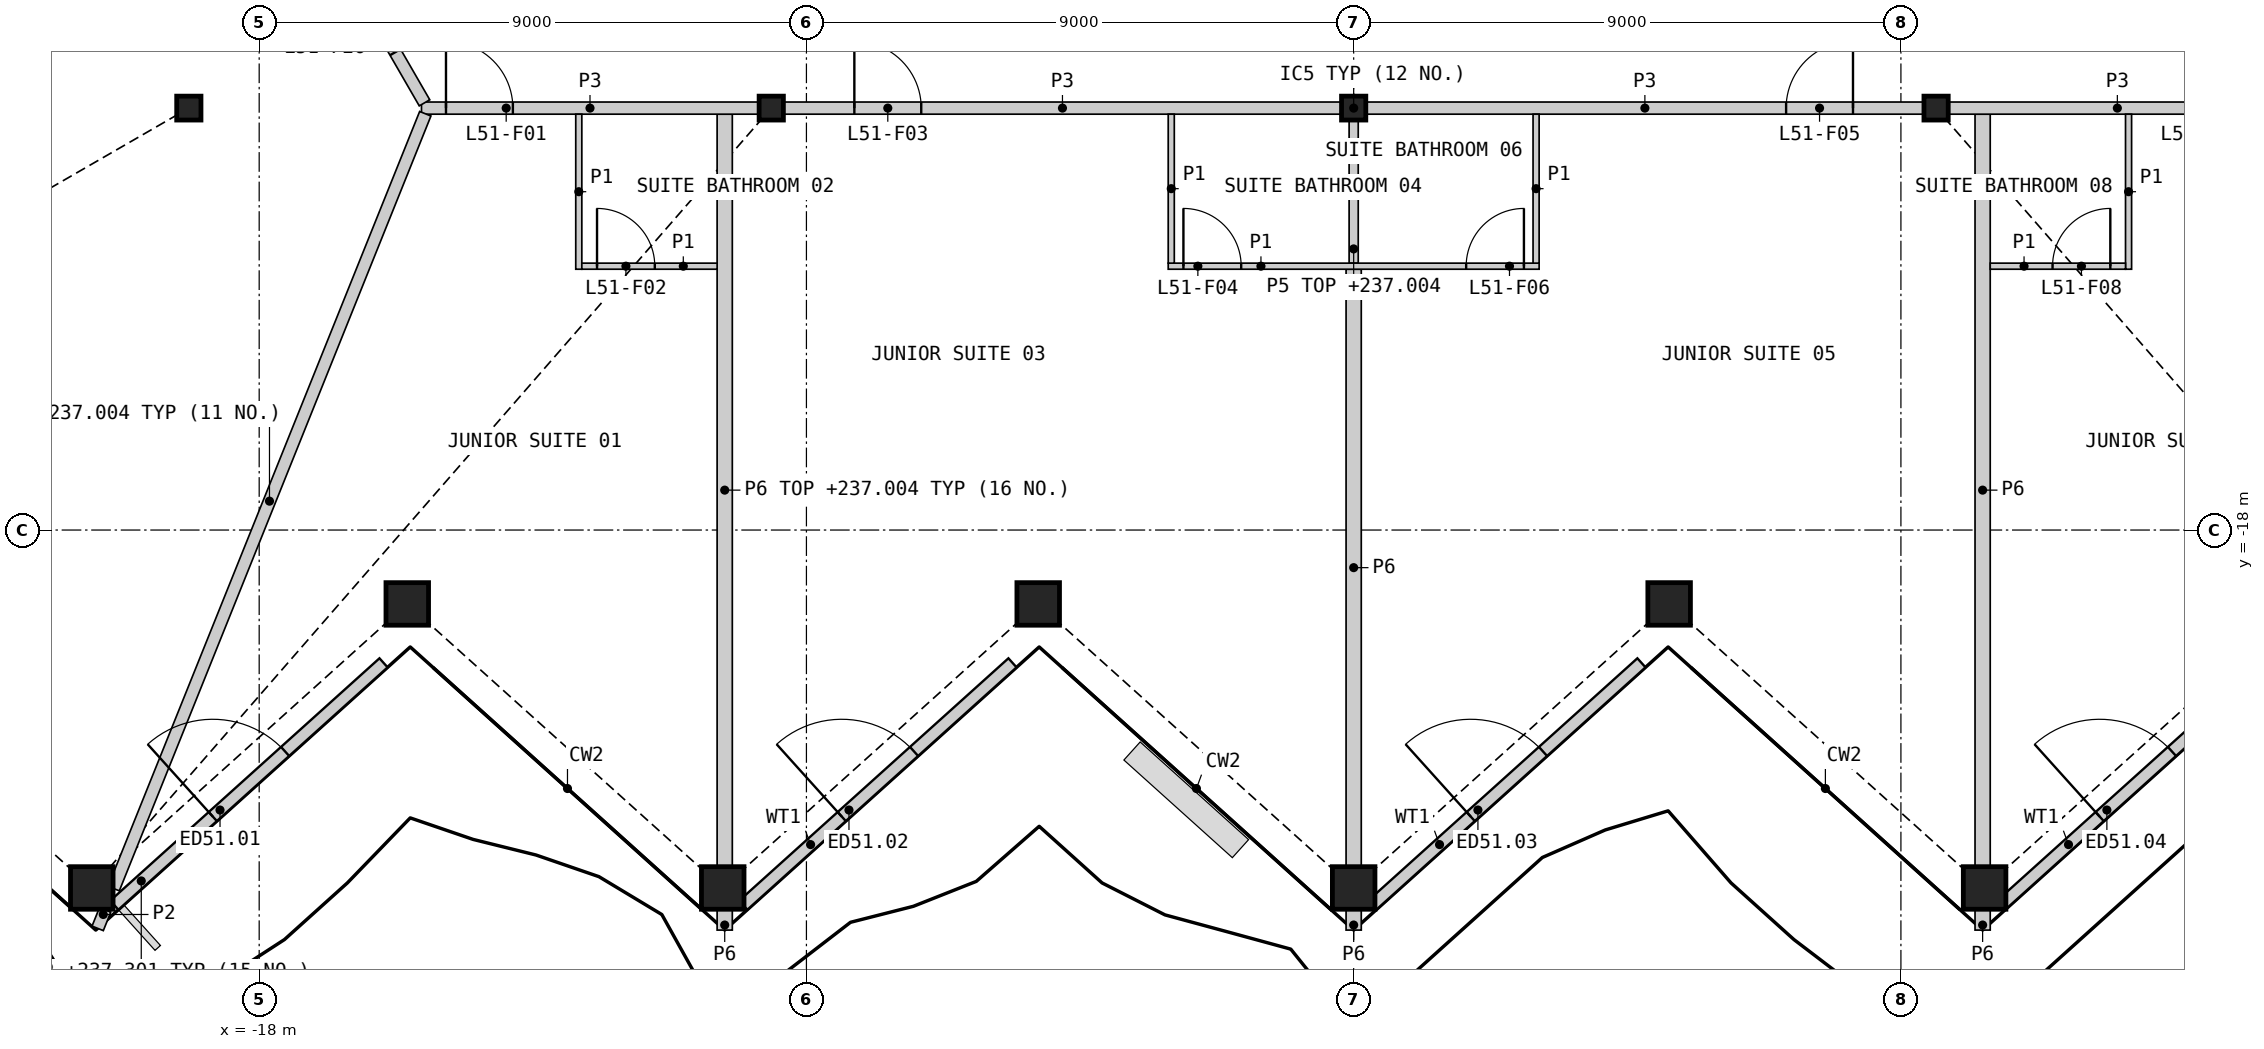
"""IFC4 building model, lengths in metres.
Left out: names, types, materials, properties, quantities, classifications, styles, units other than length and angle.
Written with IfcOpenShell. Run it as: python <this file> out.ifc"""

import sys

from ifc_helpers import new_model, si_unit, direction, frame, frame_2d, origin, origin_2d, place, context, subcontext, project, spatial, rectangle, hollow_rectangle, i_section, extrude, element, fill, save


model = new_model("IFC4")
c1 = context("Model", 3, precision=1e-05, world=origin(), true_north=direction((0.0, 1.0)))
c2 = subcontext(c1, "Body", "Model", "MODEL_VIEW")
j1 = project(units=[si_unit("LENGTHUNIT", "METRE"), si_unit("PLANEANGLEUNIT", "RADIAN")], contexts=[c1])
p1 = place(None, origin())
s1 = spatial("IfcSite", under=j1, at=p1, CompositionType="ELEMENT")
p2 = place(p1, origin())
s2 = spatial("IfcBuilding", under=s1, at=p2, CompositionType="ELEMENT")
p3 = place(p2, frame((0.0, 0.0, 234.6)))
s3 = spatial("IfcBuildingStorey", under=s2, at=p3, CompositionType="ELEMENT", Elevation=234.6)
for number, where, z_axis, x_axis in (
    (1, (-20.753, -23.887, 0.0), (0.0, 0.0, 1.0), (1.0, 0.0, 0.0)),
    (2, (-15.565, -19.215, 0.0), (0.0, 0.0, 1.0), (1.0, 0.0, 0.0)),
    (3, (-10.376, -23.887, 0.0), (0.0, 0.0, 1.0), (1.0, 0.0, 0.0)),
    (4, (-5.188, -19.215, 0.0), (0.0, 0.0, 1.0), (1.0, 0.0, 0.0)),
    (5, (0.0, -23.887, 0.0), (0.0, 0.0, 1.0), (1.0, 0.0, 0.0)),
    (6, (5.188, -19.215, 0.0), (0.0, 0.0, 1.0), (1.0, 0.0, 0.0)),
    (7, (10.376, -23.887, 0.0), (0.0, 0.0, 1.0), (1.0, 0.0, 0.0)),
):
    element("IfcColumn", number, at=place(p3, frame(where, z_axis=z_axis, x_axis=x_axis)), inside=s3, PredefinedType="COLUMN", context=c2, shape_type="SweptSolid", body=[
        extrude(hollow_rectangle(XDim=0.7, YDim=0.7, WallThickness=0.045, at=origin_2d()), origin(), (0.0, 0.0, 1.0), 3.6),
    ])
for number, where, z_axis, x_axis in (
    (8, (-19.157, -11.06, 0.0), (0.0, 0.0, 1.0), (1.0, 0.0, 0.0)),
    (9, (-9.578, -11.06, 0.0), (0.0, 0.0, 1.0), (1.0, 0.0, 0.0)),
    (10, (0.0, -11.06, 0.0), (0.0, 0.0, 1.0), (1.0, 0.0, 0.0)),
    (11, (9.578, -11.06, 0.0), (0.0, 0.0, 1.0), (1.0, 0.0, 0.0)),
):
    element("IfcColumn", number, at=place(p3, frame(where, z_axis=z_axis, x_axis=x_axis)), inside=s3, PredefinedType="COLUMN", context=c2, shape_type="SweptSolid", body=[
        extrude(i_section(OverallWidth=0.399, OverallDepth=0.393, WebThickness=0.023, FlangeThickness=0.037, at=origin_2d()), origin(), (0.0, 0.0, 1.0), 3.6),
    ])
p4 = place(p3, frame((-20.382, -24.17, 0.0), z_axis=(0.0, 0.0, 1.0), x_axis=(0.743161684399, 0.669111882155, 0.0)))
e12 = element("IfcWall", 12, at=p4, inside=s3, PredefinedType="SOLIDWALL", context=c2, shape_type="SweptSolid", body=[
    extrude(rectangle(XDim=5.958, YDim=0.2, at=frame_2d((2.979, 0.0))), origin(), (0.0, 0.0, 1.0), 2.701),
])
p5 = place(p4, frame((2.179, 0.0, 0.0)))
e13 = element("IfcOpeningElement", 13, at=p5, cuts=e12, PredefinedType="OPENING", context=c2, shape_type="SweptSolid", body=[
    extrude(rectangle(XDim=1.6, YDim=2.4, at=frame_2d((0.8, 1.2))), frame((0.0, 0.11, 0.0), z_axis=(0.0, -1.0, 0.0), x_axis=(1.0, 0.0, 0.0)), (0.0, 0.0, 1.0), 0.22),
])
p6 = place(p3, frame((-10.038, -24.17, 0.0), z_axis=(0.0, 0.0, 1.0), x_axis=(0.743143336638, 0.669132259878, 0.0)))
e14 = element("IfcWall", 14, at=p6, inside=s3, PredefinedType="SOLIDWALL", context=c2, shape_type="SweptSolid", body=[
    extrude(rectangle(XDim=5.958, YDim=0.2, at=frame_2d((2.979, 0.0))), origin(), (0.0, 0.0, 1.0), 2.701),
])
p7 = place(p6, frame((2.179, 0.0, 0.0)))
e15 = element("IfcOpeningElement", 15, at=p7, cuts=e14, PredefinedType="OPENING", context=c2, shape_type="SweptSolid", body=[
    extrude(rectangle(XDim=1.6, YDim=2.4, at=frame_2d((0.8, 1.2))), frame((0.0, 0.11, 0.0), z_axis=(0.0, -1.0, 0.0), x_axis=(1.0, 0.0, 0.0)), (0.0, 0.0, 1.0), 0.22),
])
p8 = place(p3, frame((0.305, -24.17, 0.0), z_axis=(0.0, 0.0, 1.0), x_axis=(0.743143336638, 0.669132259878, 0.0)))
e16 = element("IfcWall", 16, at=p8, inside=s3, PredefinedType="SOLIDWALL", context=c2, shape_type="SweptSolid", body=[
    extrude(rectangle(XDim=5.958, YDim=0.2, at=frame_2d((2.979, 0.0))), origin(), (0.0, 0.0, 1.0), 2.701),
])
p9 = place(p8, frame((2.179, 0.0, 0.0)))
e17 = element("IfcOpeningElement", 17, at=p9, cuts=e16, PredefinedType="OPENING", context=c2, shape_type="SweptSolid", body=[
    extrude(rectangle(XDim=1.6, YDim=2.4, at=frame_2d((0.8, 1.2))), frame((0.0, 0.11, 0.0), z_axis=(0.0, -1.0, 0.0), x_axis=(1.0, 0.0, 0.0)), (0.0, 0.0, 1.0), 0.22),
])
p10 = place(p3, frame((10.649, -24.17, 0.0), z_axis=(0.0, 0.0, 1.0), x_axis=(0.743143336638, 0.669132259878, 0.0)))
e18 = element("IfcWall", 18, at=p10, inside=s3, PredefinedType="SOLIDWALL", context=c2, shape_type="SweptSolid", body=[
    extrude(rectangle(XDim=5.958, YDim=0.2, at=frame_2d((2.979, 0.0))), origin(), (0.0, 0.0, 1.0), 2.701),
])
p11 = place(p10, frame((2.179, 0.0, 0.0)))
e19 = element("IfcOpeningElement", 19, at=p11, cuts=e18, PredefinedType="OPENING", context=c2, shape_type="SweptSolid", body=[
    extrude(rectangle(XDim=1.6, YDim=2.4, at=frame_2d((0.8, 1.2))), frame((0.0, 0.11, 0.0), z_axis=(0.0, -1.0, 0.0), x_axis=(1.0, 0.0, 0.0)), (0.0, 0.0, 1.0), 0.22),
])
for number, where, z_axis, x_axis in (
    (20, (-10.344, -23.527, 0.0), (0.0, 0.0, 1.0), (0.0, 1.0, 0.0)),
    (21, (10.344, -23.527, 0.0), (0.0, 0.0, 1.0), (0.0, 1.0, 0.0)),
):
    element("IfcWall", number, at=place(p3, frame(where, z_axis=z_axis, x_axis=x_axis)), inside=s3, PredefinedType="PARTITIONING", context=c2, shape_type="SweptSolid", body=[
        extrude(rectangle(XDim=12.366, YDim=0.25, at=frame_2d((6.183, 0.0))), origin(), (0.0, 0.0, 1.0), 2.404),
    ])
p12 = place(p3, frame((0.0, -23.527, 0.0), z_axis=(0.0, 0.0, 1.0), x_axis=(0.0, 1.0, 0.0)))
e22 = element("IfcWall", 22, at=p12, inside=s3, PredefinedType="PARTITIONING", context=c2, shape_type="SweptSolid", body=[
    extrude(rectangle(XDim=9.817, YDim=0.25, at=frame_2d((4.908, 0.0))), origin(), (0.0, 0.0, 1.0), 2.404),
])
p13 = place(p3, frame((-9.369, -11.06, 0.0), z_axis=(0.0, 0.0, 1.0), x_axis=(1.0, 0.0, 0.0)))
e23 = element("IfcWall", 23, at=p13, inside=s3, PredefinedType="PARTITIONING", context=c2, shape_type="SweptSolid", body=[
    extrude(rectangle(XDim=9.159, YDim=0.2, at=frame_2d((4.58, 0.0))), origin(), (0.0, 0.0, 1.0), 3.25),
])
p14 = place(p13, frame((1.157, 0.0, 0.0)))
e24 = element("IfcOpeningElement", 24, at=p14, cuts=e23, PredefinedType="OPENING", context=c2, shape_type="SweptSolid", body=[
    extrude(rectangle(XDim=1.1, YDim=2.1, at=frame_2d((0.55, 1.05))), frame((0.0, 0.11, 0.0), z_axis=(0.0, -1.0, 0.0), x_axis=(1.0, 0.0, 0.0)), (0.0, 0.0, 1.0), 0.22),
])
p15 = place(p3, frame((0.209, -11.06, 0.0), z_axis=(0.0, 0.0, 1.0), x_axis=(1.0, 0.0, 0.0)))
e25 = element("IfcWall", 25, at=p15, inside=s3, PredefinedType="PARTITIONING", context=c2, shape_type="SweptSolid", body=[
    extrude(rectangle(XDim=9.159, YDim=0.2, at=frame_2d((4.58, 0.0))), origin(), (0.0, 0.0, 1.0), 3.25),
])
p16 = place(p15, frame((6.902, 0.0, 0.0)))
e26 = element("IfcOpeningElement", 26, at=p16, cuts=e25, PredefinedType="OPENING", context=c2, shape_type="SweptSolid", body=[
    extrude(rectangle(XDim=1.1, YDim=2.1, at=frame_2d((0.55, 1.05))), frame((0.0, 0.11, 0.0), z_axis=(0.0, -1.0, 0.0), x_axis=(1.0, 0.0, 0.0)), (0.0, 0.0, 1.0), 0.22),
])
p17 = place(p3, frame((-15.331, -11.06, 0.0), z_axis=(0.0, 0.0, 1.0), x_axis=(1.0, 0.0, 0.0)))
e27 = element("IfcWall", 27, at=p17, inside=s3, PredefinedType="PARTITIONING", context=c2, shape_type="SweptSolid", body=[
    extrude(rectangle(XDim=5.543, YDim=0.2, at=frame_2d((2.771, 0.0))), origin(), (0.0, 0.0, 1.0), 3.25),
])
p18 = place(p17, frame((0.403, 0.0, 0.0)))
e28 = element("IfcOpeningElement", 28, at=p18, cuts=e27, PredefinedType="OPENING", context=c2, shape_type="SweptSolid", body=[
    extrude(rectangle(XDim=1.1, YDim=2.1, at=frame_2d((0.55, 1.05))), frame((0.0, 0.11, 0.0), z_axis=(0.0, -1.0, 0.0), x_axis=(1.0, 0.0, 0.0)), (0.0, 0.0, 1.0), 0.22),
])
p19 = place(p3, frame((9.788, -11.06, 0.0), z_axis=(0.0, 0.0, 1.0), x_axis=(1.0, 0.0, 0.0)))
e29 = element("IfcWall", 29, at=p19, inside=s3, PredefinedType="PARTITIONING", context=c2, shape_type="SweptSolid", body=[
    extrude(rectangle(XDim=5.543, YDim=0.2, at=frame_2d((2.771, 0.0))), origin(), (0.0, 0.0, 1.0), 3.25),
])
p20 = place(p19, frame((4.04, 0.0, 0.0)))
e30 = element("IfcOpeningElement", 30, at=p20, cuts=e29, PredefinedType="OPENING", context=c2, shape_type="SweptSolid", body=[
    extrude(rectangle(XDim=1.1, YDim=2.1, at=frame_2d((0.55, 1.05))), frame((0.0, 0.11, 0.0), z_axis=(0.0, -1.0, 0.0), x_axis=(1.0, 0.0, 0.0)), (0.0, 0.0, 1.0), 0.22),
])
p21 = place(p3, frame((-17.194, -7.66, 0.0), z_axis=(0.0, 0.0, 1.0), x_axis=(0.499989446428, -0.866031496806, 0.0)))
e31 = element("IfcWall", 31, at=p21, inside=s3, PredefinedType="PARTITIONING", context=c2, shape_type="SweptSolid", body=[
    extrude(rectangle(XDim=3.826, YDim=0.2, at=frame_2d((1.913, 0.0))), origin(), (0.0, 0.0, 1.0), 3.25),
])
p22 = place(p21, frame((1.064, 0.0, 0.0)))
e32 = element("IfcOpeningElement", 32, at=p22, cuts=e31, PredefinedType="OPENING", context=c2, shape_type="SweptSolid", body=[
    extrude(rectangle(XDim=1.8, YDim=2.1, at=frame_2d((0.9, 1.05))), frame((0.0, 0.11, 0.0), z_axis=(0.0, -1.0, 0.0), x_axis=(1.0, 0.0, 0.0)), (0.0, 0.0, 1.0), 0.22),
])
for number, where, z_axis, x_axis in (
    (33, (-10.344, -24.58, 0.0), (0.0, 0.0, 1.0), (0.0, 1.0, 0.0)),
    (34, (0.0, -24.58, 0.0), (0.0, 0.0, 1.0), (0.0, 1.0, 0.0)),
    (35, (10.344, -24.58, 0.0), (0.0, 0.0, 1.0), (0.0, 1.0, 0.0)),
):
    element("IfcWall", number, at=place(p3, frame(where, z_axis=z_axis, x_axis=x_axis)), inside=s3, PredefinedType="PARTITIONING", context=c2, shape_type="SweptSolid", body=[
        extrude(rectangle(XDim=0.333, YDim=0.25, at=frame_2d((0.167, 0.0))), origin(), (0.0, 0.0, 1.0), 2.404),
    ])
p23 = place(p3, frame((-20.393, -23.897, 0.0), z_axis=(0.0, 0.0, 1.0), x_axis=(0.373096979113, 0.927792349708, 0.0)))
e36 = element("IfcWall", 36, at=p23, inside=s3, PredefinedType="PARTITIONING", context=c2, shape_type="SweptSolid", body=[
    extrude(rectangle(XDim=13.736, YDim=0.2, at=frame_2d((6.868, 0.0))), origin(), (0.0, 0.0, 1.0), 2.404),
])
p24 = place(p3, frame((-20.656, -24.551, 0.0), z_axis=(0.0, 0.0, 1.0), x_axis=(0.372801499492, 0.927911117498, 0.0)))
e37 = element("IfcWall", 37, at=p24, inside=s3, PredefinedType="PARTITIONING", context=c2, shape_type="SweptSolid", body=[
    extrude(rectangle(XDim=0.328, YDim=0.2, at=frame_2d((0.164, 0.0))), origin(), (0.0, 0.0, 1.0), 2.404),
])
p25 = place(p3, frame((0.0, -13.61, 0.0), z_axis=(0.0, 0.0, 1.0), x_axis=(0.0, 1.0, 0.0)))
e38 = element("IfcWall", 38, at=p25, inside=s3, PredefinedType="PLUMBINGWALL", context=c2, shape_type="SweptSolid", body=[
    extrude(rectangle(XDim=2.341, YDim=0.15, at=frame_2d((1.17, 0.0))), origin(), (0.0, 0.0, 1.0), 2.404),
])
p26 = place(p3, frame((-3.05, -13.66, 0.0), z_axis=(0.0, 0.0, 1.0), x_axis=(1.0, 0.0, 0.0)))
e39 = element("IfcWall", 39, at=p26, inside=s3, PredefinedType="PARTITIONING", context=c2, shape_type="SweptSolid", body=[
    extrude(rectangle(XDim=6.1, YDim=0.1, at=frame_2d((3.05, 0.0))), origin(), (0.0, 0.0, 1.0), 2.404),
])
p27 = place(p26, frame((0.25, 0.0, 0.0)))
e40 = element("IfcOpeningElement", 40, at=p27, cuts=e39, PredefinedType="OPENING", context=c2, shape_type="SweptSolid", body=[
    extrude(rectangle(XDim=0.95, YDim=2.1, at=frame_2d((0.475, 1.05))), frame((0.0, 0.06, 0.0), z_axis=(0.0, -1.0, 0.0), x_axis=(1.0, 0.0, 0.0)), (0.0, 0.0, 1.0), 0.12),
])
p28 = place(p26, frame((4.9, 0.0, 0.0)))
e41 = element("IfcOpeningElement", 41, at=p28, cuts=e39, PredefinedType="OPENING", context=c2, shape_type="SweptSolid", body=[
    extrude(rectangle(XDim=0.95, YDim=2.1, at=frame_2d((0.475, 1.05))), frame((0.0, 0.06, 0.0), z_axis=(0.0, -1.0, 0.0), x_axis=(1.0, 0.0, 0.0)), (0.0, 0.0, 1.0), 0.12),
])
p29 = place(p3, frame((-12.744, -13.71, 0.0), z_axis=(0.0, 0.0, 1.0), x_axis=(0.0, 1.0, 0.0)))
e42 = element("IfcWall", 42, at=p29, inside=s3, PredefinedType="PARTITIONING", context=c2, shape_type="SweptSolid", body=[
    extrude(rectangle(XDim=2.55, YDim=0.1, at=frame_2d((1.275, 0.0))), origin(), (0.0, 0.0, 1.0), 2.404),
])
for number, where, z_axis, x_axis in (
    (43, (-3.0, -13.61, 0.0), (0.0, 0.0, 1.0), (0.0, 1.0, 0.0)),
    (44, (3.0, -13.61, 0.0), (0.0, 0.0, 1.0), (0.0, 1.0, 0.0)),
):
    element("IfcWall", number, at=place(p3, frame(where, z_axis=z_axis, x_axis=x_axis)), inside=s3, PredefinedType="PARTITIONING", context=c2, shape_type="SweptSolid", body=[
        extrude(rectangle(XDim=2.45, YDim=0.1, at=frame_2d((1.225, 0.0))), origin(), (0.0, 0.0, 1.0), 2.404),
    ])
p30 = place(p3, frame((12.744, -13.71, 0.0), z_axis=(0.0, 0.0, 1.0), x_axis=(0.0, 1.0, 0.0)))
e45 = element("IfcWall", 45, at=p30, inside=s3, PredefinedType="PARTITIONING", context=c2, shape_type="SweptSolid", body=[
    extrude(rectangle(XDim=2.55, YDim=0.1, at=frame_2d((1.275, 0.0))), origin(), (0.0, 0.0, 1.0), 2.404),
])
p31 = place(p3, frame((-12.694, -13.66, 0.0), z_axis=(0.0, 0.0, 1.0), x_axis=(1.0, 0.0, 0.0)))
e46 = element("IfcWall", 46, at=p31, inside=s3, PredefinedType="PARTITIONING", context=c2, shape_type="SweptSolid", body=[
    extrude(rectangle(XDim=2.225, YDim=0.1, at=frame_2d((1.113, 0.0))), origin(), (0.0, 0.0, 1.0), 2.404),
])
p32 = place(p31, frame((0.25, 0.0, 0.0)))
e47 = element("IfcOpeningElement", 47, at=p32, cuts=e46, PredefinedType="OPENING", context=c2, shape_type="SweptSolid", body=[
    extrude(rectangle(XDim=0.95, YDim=2.1, at=frame_2d((0.475, 1.05))), frame((0.0, 0.06, 0.0), z_axis=(0.0, -1.0, 0.0), x_axis=(1.0, 0.0, 0.0)), (0.0, 0.0, 1.0), 0.12),
])
p33 = place(p3, frame((10.469, -13.66, 0.0), z_axis=(0.0, 0.0, 1.0), x_axis=(1.0, 0.0, 0.0)))
e48 = element("IfcWall", 48, at=p33, inside=s3, PredefinedType="PARTITIONING", context=c2, shape_type="SweptSolid", body=[
    extrude(rectangle(XDim=2.225, YDim=0.1, at=frame_2d((1.113, 0.0))), origin(), (0.0, 0.0, 1.0), 2.404),
])
p34 = place(p33, frame((1.025, 0.0, 0.0)))
e49 = element("IfcOpeningElement", 49, at=p34, cuts=e48, PredefinedType="OPENING", context=c2, shape_type="SweptSolid", body=[
    extrude(rectangle(XDim=0.95, YDim=2.1, at=frame_2d((0.475, 1.05))), frame((0.0, 0.06, 0.0), z_axis=(0.0, -1.0, 0.0), x_axis=(1.0, 0.0, 0.0)), (0.0, 0.0, 1.0), 0.12),
])
p35 = place(p5, origin())
e50 = element("IfcDoor", 50, at=p35, inside=s3, OperationType="DOUBLE_DOOR_SINGLE_SWING", PredefinedType="DOOR", context=c2, shape_type="SweptSolid", body=[
    extrude(rectangle(XDim=1.6, YDim=2.4, at=frame_2d((0.8, 1.2))), frame((0.0, 0.025, 0.0), z_axis=(0.0, -1.0, 0.0), x_axis=(1.0, 0.0, 0.0)), (0.0, 0.0, 1.0), 0.05),
])
fill(e13, e50)
p36 = place(p7, origin())
e51 = element("IfcDoor", 51, at=p36, inside=s3, OperationType="DOUBLE_DOOR_SINGLE_SWING", PredefinedType="DOOR", context=c2, shape_type="SweptSolid", body=[
    extrude(rectangle(XDim=1.6, YDim=2.4, at=frame_2d((0.8, 1.2))), frame((0.0, 0.025, 0.0), z_axis=(0.0, -1.0, 0.0), x_axis=(1.0, 0.0, 0.0)), (0.0, 0.0, 1.0), 0.05),
])
fill(e15, e51)
p37 = place(p9, origin())
e52 = element("IfcDoor", 52, at=p37, inside=s3, OperationType="DOUBLE_DOOR_SINGLE_SWING", PredefinedType="DOOR", context=c2, shape_type="SweptSolid", body=[
    extrude(rectangle(XDim=1.6, YDim=2.4, at=frame_2d((0.8, 1.2))), frame((0.0, 0.025, 0.0), z_axis=(0.0, -1.0, 0.0), x_axis=(1.0, 0.0, 0.0)), (0.0, 0.0, 1.0), 0.05),
])
fill(e17, e52)
p38 = place(p11, origin())
e53 = element("IfcDoor", 53, at=p38, inside=s3, OperationType="DOUBLE_DOOR_SINGLE_SWING", PredefinedType="DOOR", context=c2, shape_type="SweptSolid", body=[
    extrude(rectangle(XDim=1.6, YDim=2.4, at=frame_2d((0.8, 1.2))), frame((0.0, 0.025, 0.0), z_axis=(0.0, -1.0, 0.0), x_axis=(1.0, 0.0, 0.0)), (0.0, 0.0, 1.0), 0.05),
])
fill(e19, e53)
p39 = place(p18, origin())
e54 = element("IfcDoor", 54, at=p39, inside=s3, OperationType="SINGLE_SWING_LEFT", PredefinedType="DOOR", context=c2, shape_type="SweptSolid", body=[
    extrude(rectangle(XDim=1.1, YDim=2.1, at=frame_2d((0.55, 1.05))), frame((0.0, 0.025, 0.0), z_axis=(0.0, -1.0, 0.0), x_axis=(1.0, 0.0, 0.0)), (0.0, 0.0, 1.0), 0.05),
])
fill(e28, e54)
p40 = place(p32, origin())
e55 = element("IfcDoor", 55, at=p40, inside=s3, OperationType="SINGLE_SWING_LEFT", PredefinedType="DOOR", context=c2, shape_type="SweptSolid", body=[
    extrude(rectangle(XDim=0.95, YDim=2.1, at=frame_2d((0.475, 1.05))), frame((0.0, 0.025, 0.0), z_axis=(0.0, -1.0, 0.0), x_axis=(1.0, 0.0, 0.0)), (0.0, 0.0, 1.0), 0.05),
])
fill(e47, e55)
p41 = place(p14, origin())
e56 = element("IfcDoor", 56, at=p41, inside=s3, OperationType="SINGLE_SWING_LEFT", PredefinedType="DOOR", context=c2, shape_type="SweptSolid", body=[
    extrude(rectangle(XDim=1.1, YDim=2.1, at=frame_2d((0.55, 1.05))), frame((0.0, 0.025, 0.0), z_axis=(0.0, -1.0, 0.0), x_axis=(1.0, 0.0, 0.0)), (0.0, 0.0, 1.0), 0.05),
])
fill(e24, e56)
p42 = place(p27, origin())
e57 = element("IfcDoor", 57, at=p42, inside=s3, OperationType="SINGLE_SWING_LEFT", PredefinedType="DOOR", context=c2, shape_type="SweptSolid", body=[
    extrude(rectangle(XDim=0.95, YDim=2.1, at=frame_2d((0.475, 1.05))), frame((0.0, 0.025, 0.0), z_axis=(0.0, -1.0, 0.0), x_axis=(1.0, 0.0, 0.0)), (0.0, 0.0, 1.0), 0.05),
])
fill(e40, e57)
p43 = place(p16, origin())
e58 = element("IfcDoor", 58, at=p43, inside=s3, OperationType="SINGLE_SWING_RIGHT", PredefinedType="DOOR", context=c2, shape_type="SweptSolid", body=[
    extrude(rectangle(XDim=1.1, YDim=2.1, at=frame_2d((0.55, 1.05))), frame((0.0, 0.025, 0.0), z_axis=(0.0, -1.0, 0.0), x_axis=(1.0, 0.0, 0.0)), (0.0, 0.0, 1.0), 0.05),
])
fill(e26, e58)
p44 = place(p28, origin())
e59 = element("IfcDoor", 59, at=p44, inside=s3, OperationType="SINGLE_SWING_RIGHT", PredefinedType="DOOR", context=c2, shape_type="SweptSolid", body=[
    extrude(rectangle(XDim=0.95, YDim=2.1, at=frame_2d((0.475, 1.05))), frame((0.0, 0.025, 0.0), z_axis=(0.0, -1.0, 0.0), x_axis=(1.0, 0.0, 0.0)), (0.0, 0.0, 1.0), 0.05),
])
fill(e41, e59)
p45 = place(p34, origin())
e60 = element("IfcDoor", 60, at=p45, inside=s3, OperationType="SINGLE_SWING_RIGHT", PredefinedType="DOOR", context=c2, shape_type="SweptSolid", body=[
    extrude(rectangle(XDim=0.95, YDim=2.1, at=frame_2d((0.475, 1.05))), frame((0.0, 0.025, 0.0), z_axis=(0.0, -1.0, 0.0), x_axis=(1.0, 0.0, 0.0)), (0.0, 0.0, 1.0), 0.05),
])
fill(e49, e60)
p46 = place(p22, origin())
e61 = element("IfcDoor", 61, at=p46, inside=s3, OperationType="DOUBLE_DOOR_SINGLE_SWING", PredefinedType="DOOR", context=c2, shape_type="SweptSolid", body=[
    extrude(rectangle(XDim=1.8, YDim=2.1, at=frame_2d((0.9, 1.05))), frame((0.0, 0.025, 0.0), z_axis=(0.0, -1.0, 0.0), x_axis=(1.0, 0.0, 0.0)), (0.0, 0.0, 1.0), 0.05),
])
fill(e32, e61)
save(model, sys.argv[1])
